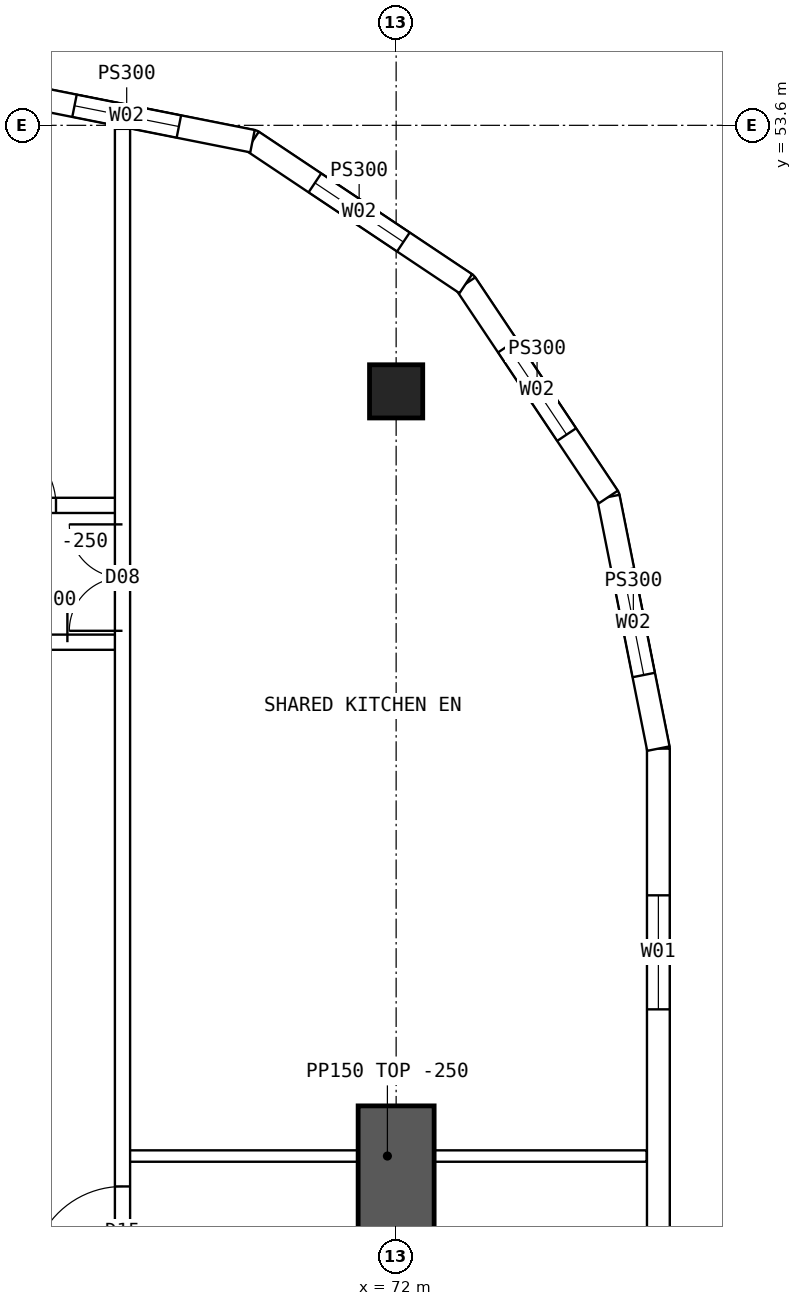
"""IFC4 building model, lengths in metres.
Left out: names, types, materials, properties, quantities, classifications, styles, units other than length and angle.
Written with IfcOpenShell. Run it as: python <this file> out.ifc"""

import sys

from ifc_helpers import new_model, si_unit, direction, frame, frame_2d, origin, origin_2d, place, context, subcontext, project, spatial, polyline, rectangle, hollow_rectangle, outline, extrude, element, fill, save


model = new_model("IFC4")
c1 = context("Model", 3, precision=1e-05, world=origin(), true_north=direction((0.0, 1.0)))
c2 = subcontext(c1, "Body", "Model", "MODEL_VIEW")
j1 = project(units=[si_unit("LENGTHUNIT", "METRE"), si_unit("PLANEANGLEUNIT", "RADIAN")], contexts=[c1])
p1 = place(None, origin())
s1 = spatial("IfcSite", under=j1, at=p1, CompositionType="ELEMENT")
p2 = place(p1, origin())
s2 = spatial("IfcBuilding", under=s1, at=p2, CompositionType="ELEMENT")
p3 = place(p2, frame((0.0, 0.0, 148.6)))
s3 = spatial("IfcBuildingStorey", under=s2, at=p3, CompositionType="ELEMENT", Elevation=148.6)
p4 = place(p3, frame((72.0, 50.1, 0.0), z_axis=(0.0, 0.0, 1.0), x_axis=(1.0, 0.0, 0.0)))
e1 = element("IfcColumn", 1, at=p4, inside=s3, PredefinedType="COLUMN", context=c2, shape_type="SweptSolid", body=[
    extrude(hollow_rectangle(XDim=0.7, YDim=0.7, WallThickness=0.07, at=origin_2d()), origin(), (0.0, 0.0, 1.0), 3.75),
])
p5 = place(p3, frame((72.0, 35.7, 0.0), z_axis=(0.0, 0.0, 1.0), x_axis=(0.0, 1.0, 0.0)))
e2 = element("IfcWall", 2, at=p5, inside=s3, PredefinedType="SHEAR", context=c2, shape_type="SweptSolid", body=[
    extrude(rectangle(XDim=5.0, YDim=1.0, at=frame_2d((2.5, 0.0))), origin(), (0.0, 0.0, 1.0), 3.75),
])
p6 = place(p3, frame((75.45, 18.6, 0.0), z_axis=(0.0, 0.0, 1.0), x_axis=(0.0, 1.0, 0.0)))
e3 = element("IfcWall", 3, at=p6, inside=s3, PredefinedType="SOLIDWALL", context=c2, shape_type="SweptSolid", body=[
    extrude(outline(polyline([(-0.015, -0.15), (26.815, -0.15), (26.785, 0.15), (0.015, 0.15), (-0.015, -0.15)])), origin(), (0.0, 0.0, 1.0), 3.5),
])
p7 = place(p6, frame((1.93, 0.0, 0.9)))
e4 = element("IfcOpeningElement", 4, at=p7, cuts=e3, PredefinedType="OPENING", context=c2, shape_type="SweptSolid", body=[
    extrude(rectangle(XDim=1.5, YDim=2.0, at=frame_2d((0.75, 1.0))), frame((0.0, 0.16, 0.0), z_axis=(0.0, -1.0, 0.0), x_axis=(1.0, 0.0, 0.0)), (0.0, 0.0, 1.0), 0.32),
])
p8 = place(p6, frame((7.29, 0.0, 0.9)))
e5 = element("IfcOpeningElement", 5, at=p8, cuts=e3, PredefinedType="OPENING", context=c2, shape_type="SweptSolid", body=[
    extrude(rectangle(XDim=1.5, YDim=2.0, at=frame_2d((0.75, 1.0))), frame((0.0, 0.16, 0.0), z_axis=(0.0, -1.0, 0.0), x_axis=(1.0, 0.0, 0.0)), (0.0, 0.0, 1.0), 0.32),
])
p9 = place(p6, frame((12.65, 0.0, 0.9)))
e6 = element("IfcOpeningElement", 6, at=p9, cuts=e3, PredefinedType="OPENING", context=c2, shape_type="SweptSolid", body=[
    extrude(rectangle(XDim=1.5, YDim=2.0, at=frame_2d((0.75, 1.0))), frame((0.0, 0.16, 0.0), z_axis=(0.0, -1.0, 0.0), x_axis=(1.0, 0.0, 0.0)), (0.0, 0.0, 1.0), 0.32),
])
p10 = place(p6, frame((18.01, 0.0, 0.9)))
e7 = element("IfcOpeningElement", 7, at=p10, cuts=e3, PredefinedType="OPENING", context=c2, shape_type="SweptSolid", body=[
    extrude(rectangle(XDim=1.5, YDim=2.0, at=frame_2d((0.75, 1.0))), frame((0.0, 0.16, 0.0), z_axis=(0.0, -1.0, 0.0), x_axis=(1.0, 0.0, 0.0)), (0.0, 0.0, 1.0), 0.32),
])
p11 = place(p6, frame((23.37, 0.0, 0.9)))
e8 = element("IfcOpeningElement", 8, at=p11, cuts=e3, PredefinedType="OPENING", context=c2, shape_type="SweptSolid", body=[
    extrude(rectangle(XDim=1.5, YDim=2.0, at=frame_2d((0.75, 1.0))), frame((0.0, 0.16, 0.0), z_axis=(0.0, -1.0, 0.0), x_axis=(1.0, 0.0, 0.0)), (0.0, 0.0, 1.0), 0.32),
])
p12 = place(p3, frame((75.45, 45.4, 0.0), z_axis=(0.0, 0.0, 1.0), x_axis=(-0.19508664885, 0.980786011034, 0.0)))
e9 = element("IfcWall", 9, at=p12, inside=s3, PredefinedType="SOLIDWALL", context=c2, shape_type="SweptSolid", body=[
    extrude(outline(polyline([(-0.015, -0.15), (3.405, -0.15), (3.345, 0.15), (0.015, 0.15), (-0.015, -0.15)])), origin(), (0.0, 0.0, 1.0), 3.5),
])
p13 = place(p12, frame((0.988, 0.0, 0.9)))
e10 = element("IfcOpeningElement", 10, at=p13, cuts=e9, PredefinedType="OPENING", context=c2, shape_type="SweptSolid", body=[
    extrude(rectangle(XDim=1.4, YDim=1.8, at=frame_2d((0.7, 0.9))), frame((0.0, 0.16, 0.0), z_axis=(0.0, -1.0, 0.0), x_axis=(1.0, 0.0, 0.0)), (0.0, 0.0, 1.0), 0.32),
])
p14 = place(p3, frame((74.792, 48.71, 0.0), z_axis=(0.0, 0.0, 1.0), x_axis=(-0.555534554399, 0.831493450887, 0.0)))
e11 = element("IfcWall", 11, at=p14, inside=s3, PredefinedType="SOLIDWALL", context=c2, shape_type="SweptSolid", body=[
    extrude(outline(polyline([(-0.03, -0.15), (3.405, -0.15), (3.345, 0.15), (0.03, 0.15), (-0.03, -0.15)])), origin(), (0.0, 0.0, 1.0), 3.5),
])
p15 = place(p14, frame((0.988, 0.0, 0.9)))
e12 = element("IfcOpeningElement", 12, at=p15, cuts=e11, PredefinedType="OPENING", context=c2, shape_type="SweptSolid", body=[
    extrude(rectangle(XDim=1.4, YDim=1.8, at=frame_2d((0.7, 0.9))), frame((0.0, 0.16, 0.0), z_axis=(0.0, -1.0, 0.0), x_axis=(1.0, 0.0, 0.0)), (0.0, 0.0, 1.0), 0.32),
])
p16 = place(p3, frame((72.917, 51.517, 0.0), z_axis=(0.0, 0.0, 1.0), x_axis=(-0.831493450887, 0.555534554399, 0.0)))
e13 = element("IfcWall", 13, at=p16, inside=s3, PredefinedType="SOLIDWALL", context=c2, shape_type="SweptSolid", body=[
    extrude(outline(polyline([(-0.03, -0.15), (3.405, -0.15), (3.345, 0.15), (0.03, 0.15), (-0.03, -0.15)])), origin(), (0.0, 0.0, 1.0), 3.5),
])
p17 = place(p16, frame((0.988, 0.0, 0.9)))
e14 = element("IfcOpeningElement", 14, at=p17, cuts=e13, PredefinedType="OPENING", context=c2, shape_type="SweptSolid", body=[
    extrude(rectangle(XDim=1.4, YDim=1.8, at=frame_2d((0.7, 0.9))), frame((0.0, 0.16, 0.0), z_axis=(0.0, -1.0, 0.0), x_axis=(1.0, 0.0, 0.0)), (0.0, 0.0, 1.0), 0.32),
])
p18 = place(p3, frame((70.11, 53.392, 0.0), z_axis=(0.0, 0.0, 1.0), x_axis=(-0.98078325777, 0.195100490205, 0.0)))
e15 = element("IfcWall", 15, at=p18, inside=s3, PredefinedType="SOLIDWALL", context=c2, shape_type="SweptSolid", body=[
    extrude(outline(polyline([(-0.03, -0.15), (3.405, -0.15), (3.345, 0.15), (0.03, 0.15), (-0.03, -0.15)])), origin(), (0.0, 0.0, 1.0), 3.5),
])
p19 = place(p18, frame((0.988, 0.0, 0.9)))
e16 = element("IfcOpeningElement", 16, at=p19, cuts=e15, PredefinedType="OPENING", context=c2, shape_type="SweptSolid", body=[
    extrude(rectangle(XDim=1.4, YDim=1.8, at=frame_2d((0.7, 0.9))), frame((0.0, 0.16, 0.0), z_axis=(0.0, -1.0, 0.0), x_axis=(1.0, 0.0, 0.0)), (0.0, 0.0, 1.0), 0.32),
])
p20 = place(p3, frame((66.425, 48.6, 0.0), z_axis=(0.0, 0.0, 1.0), x_axis=(1.0, 0.0, 0.0)))
e17 = element("IfcWall", 17, at=p20, inside=s3, PredefinedType="SOLIDWALL", context=c2, shape_type="SweptSolid", body=[
    extrude(rectangle(XDim=1.975, YDim=0.2, at=frame_2d((0.987, 0.0))), origin(), (0.0, 0.0, 1.0), 3.5),
])
p21 = place(p20, frame((0.2, 0.0, 0.0)))
e18 = element("IfcOpeningElement", 18, at=p21, cuts=e17, PredefinedType="OPENING", context=c2, shape_type="SweptSolid", body=[
    extrude(rectangle(XDim=0.9, YDim=2.1, at=frame_2d((0.45, 1.05))), frame((0.0, 0.11, 0.0), z_axis=(0.0, -1.0, 0.0), x_axis=(1.0, 0.0, 0.0)), (0.0, 0.0, 1.0), 0.22),
])
p22 = place(p3, frame((66.425, 46.8, 0.0), z_axis=(0.0, 0.0, 1.0), x_axis=(1.0, 0.0, 0.0)))
e19 = element("IfcWall", 19, at=p22, inside=s3, PredefinedType="SOLIDWALL", context=c2, shape_type="SweptSolid", body=[
    extrude(rectangle(XDim=1.975, YDim=0.2, at=frame_2d((0.987, 0.0))), origin(), (0.0, 0.0, 1.0), 3.5),
])
p23 = place(p22, frame((0.05, 0.0, 0.0)))
e20 = element("IfcOpeningElement", 20, at=p23, cuts=e19, PredefinedType="OPENING", context=c2, shape_type="SweptSolid", body=[
    extrude(rectangle(XDim=1.2, YDim=2.1, at=frame_2d((0.6, 1.05))), frame((0.0, 0.11, 0.0), z_axis=(0.0, -1.0, 0.0), x_axis=(1.0, 0.0, 0.0)), (0.0, 0.0, 1.0), 0.22),
])
p24 = place(p3, frame((68.4, 10.446, 0.0), z_axis=(0.0, 0.0, 1.0), x_axis=(0.0, 1.0, 0.0)))
e21 = element("IfcWall", 21, at=p24, inside=s3, PredefinedType="SOLIDWALL", context=c2, shape_type="SweptSolid", body=[
    extrude(rectangle(XDim=43.107, YDim=0.2, at=frame_2d((21.554, 0.0))), origin(), (0.0, 0.0, 1.0), 3.5),
])
p25 = place(p24, frame((27.994, 0.0, 0.0)))
e22 = element("IfcOpeningElement", 22, at=p25, cuts=e21, PredefinedType="OPENING", context=c2, shape_type="SweptSolid", body=[
    extrude(rectangle(XDim=1.2, YDim=2.1, at=frame_2d((0.6, 1.05))), frame((0.0, 0.11, 0.0), z_axis=(0.0, -1.0, 0.0), x_axis=(1.0, 0.0, 0.0)), (0.0, 0.0, 1.0), 0.22),
])
p26 = place(p24, frame((5.104, 0.0, 0.0)))
e23 = element("IfcOpeningElement", 23, at=p26, cuts=e21, PredefinedType="OPENING", context=c2, shape_type="SweptSolid", body=[
    extrude(rectangle(XDim=1.4, YDim=2.1, at=frame_2d((0.7, 1.05))), frame((0.0, 0.11, 0.0), z_axis=(0.0, -1.0, 0.0), x_axis=(1.0, 0.0, 0.0)), (0.0, 0.0, 1.0), 0.22),
])
p27 = place(p24, frame((36.504, 0.0, 0.0)))
e24 = element("IfcOpeningElement", 24, at=p27, cuts=e21, PredefinedType="OPENING", context=c2, shape_type="SweptSolid", body=[
    extrude(rectangle(XDim=1.4, YDim=2.1, at=frame_2d((0.7, 1.05))), frame((0.0, 0.11, 0.0), z_axis=(0.0, -1.0, 0.0), x_axis=(1.0, 0.0, 0.0)), (0.0, 0.0, 1.0), 0.22),
])
p28 = place(p3, frame((68.475, 40.04, 0.0), z_axis=(0.0, 0.0, 1.0), x_axis=(1.0, 0.0, 0.0)))
e25 = element("IfcWall", 25, at=p28, inside=s3, PredefinedType="PARTITIONING", context=c2, shape_type="SweptSolid", body=[
    extrude(rectangle(XDim=6.82, YDim=0.15, at=frame_2d((3.41, 0.0))), origin(), (0.0, 0.0, 1.0), 3.5),
])
p29 = place(p11, origin())
e26 = element("IfcWindow", 26, at=p29, inside=s3, PartitioningType="SINGLE_PANEL", PredefinedType="WINDOW", context=c2, shape_type="SweptSolid", body=[
    extrude(rectangle(XDim=1.5, YDim=2.0, at=frame_2d((0.75, 1.0))), frame((0.0, 0.03, 0.0), z_axis=(0.0, -1.0, 0.0), x_axis=(1.0, 0.0, 0.0)), (0.0, 0.0, 1.0), 0.06),
])
fill(e8, e26)
p30 = place(p13, origin())
e27 = element("IfcWindow", 27, at=p30, inside=s3, PartitioningType="SINGLE_PANEL", PredefinedType="WINDOW", context=c2, shape_type="SweptSolid", body=[
    extrude(rectangle(XDim=1.4, YDim=1.8, at=frame_2d((0.7, 0.9))), frame((0.0, 0.03, 0.0), z_axis=(0.0, -1.0, 0.0), x_axis=(1.0, 0.0, 0.0)), (0.0, 0.0, 1.0), 0.06),
])
fill(e10, e27)
p31 = place(p15, origin())
e28 = element("IfcWindow", 28, at=p31, inside=s3, PartitioningType="SINGLE_PANEL", PredefinedType="WINDOW", context=c2, shape_type="SweptSolid", body=[
    extrude(rectangle(XDim=1.4, YDim=1.8, at=frame_2d((0.7, 0.9))), frame((0.0, 0.03, 0.0), z_axis=(0.0, -1.0, 0.0), x_axis=(1.0, 0.0, 0.0)), (0.0, 0.0, 1.0), 0.06),
])
fill(e12, e28)
p32 = place(p17, origin())
e29 = element("IfcWindow", 29, at=p32, inside=s3, PartitioningType="SINGLE_PANEL", PredefinedType="WINDOW", context=c2, shape_type="SweptSolid", body=[
    extrude(rectangle(XDim=1.4, YDim=1.8, at=frame_2d((0.7, 0.9))), frame((0.0, 0.03, 0.0), z_axis=(0.0, -1.0, 0.0), x_axis=(1.0, 0.0, 0.0)), (0.0, 0.0, 1.0), 0.06),
])
fill(e14, e29)
p33 = place(p19, origin())
e30 = element("IfcWindow", 30, at=p33, inside=s3, PartitioningType="SINGLE_PANEL", PredefinedType="WINDOW", context=c2, shape_type="SweptSolid", body=[
    extrude(rectangle(XDim=1.4, YDim=1.8, at=frame_2d((0.7, 0.9))), frame((0.0, 0.03, 0.0), z_axis=(0.0, -1.0, 0.0), x_axis=(1.0, 0.0, 0.0)), (0.0, 0.0, 1.0), 0.06),
])
fill(e16, e30)
p34 = place(p23, origin())
e31 = element("IfcDoor", 31, at=p34, inside=s3, OperationType="DOUBLE_DOOR_SINGLE_SWING", PredefinedType="DOOR", context=c2, shape_type="SweptSolid", body=[
    extrude(rectangle(XDim=1.2, YDim=2.1, at=frame_2d((0.6, 1.05))), frame((0.0, 0.025, 0.0), z_axis=(0.0, -1.0, 0.0), x_axis=(1.0, 0.0, 0.0)), (0.0, 0.0, 1.0), 0.05),
])
fill(e20, e31)
p35 = place(p25, origin())
e32 = element("IfcDoor", 32, at=p35, inside=s3, OperationType="SINGLE_SWING_LEFT", PredefinedType="DOOR", context=c2, shape_type="SweptSolid", body=[
    extrude(rectangle(XDim=1.2, YDim=2.1, at=frame_2d((0.6, 1.05))), frame((0.0, 0.025, 0.0), z_axis=(0.0, -1.0, 0.0), x_axis=(1.0, 0.0, 0.0)), (0.0, 0.0, 1.0), 0.05),
])
fill(e22, e32)
p36 = place(p27, origin())
e33 = element("IfcDoor", 33, at=p36, inside=s3, OperationType="DOUBLE_DOOR_SINGLE_SWING", PredefinedType="DOOR", context=c2, shape_type="SweptSolid", body=[
    extrude(rectangle(XDim=1.4, YDim=2.1, at=frame_2d((0.7, 1.05))), frame((0.0, 0.025, 0.0), z_axis=(0.0, -1.0, 0.0), x_axis=(1.0, 0.0, 0.0)), (0.0, 0.0, 1.0), 0.05),
])
fill(e24, e33)
p37 = place(p21, origin())
e34 = element("IfcDoor", 34, at=p37, inside=s3, OperationType="SINGLE_SWING_LEFT", PredefinedType="DOOR", context=c2, shape_type="SweptSolid", body=[
    extrude(rectangle(XDim=0.9, YDim=2.1, at=frame_2d((0.45, 1.05))), frame((0.0, 0.025, 0.0), z_axis=(0.0, -1.0, 0.0), x_axis=(1.0, 0.0, 0.0)), (0.0, 0.0, 1.0), 0.05),
])
fill(e18, e34)
save(model, sys.argv[1])
